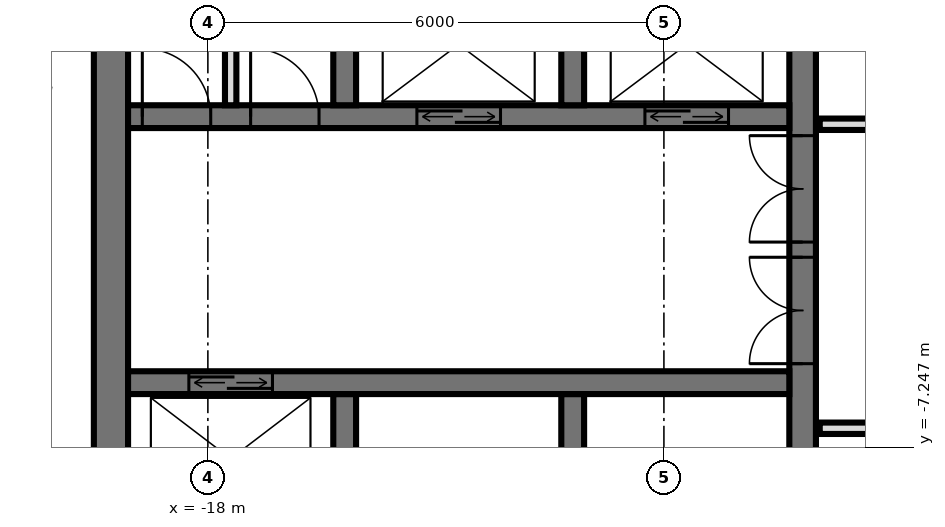
"""IFC4 building model, lengths in metres.
Left out: names, types, materials, properties, quantities, classifications, styles, units other than length and angle.
Written with IfcOpenShell. Run it as: python <this file> out.ifc"""

import sys

from ifc_helpers import new_model, si_unit, direction, frame, frame_2d, origin, place, context, subcontext, project, spatial, rectangle, extrude, element, fill, save


model = new_model("IFC4")
c1 = context("Model", 3, precision=1e-05, world=origin(), true_north=direction((0.0, 1.0)))
c2 = subcontext(c1, "Body", "Model", "MODEL_VIEW")
j1 = project(units=[si_unit("LENGTHUNIT", "METRE"), si_unit("PLANEANGLEUNIT", "RADIAN")], contexts=[c1])
p1 = place(None, origin())
s1 = spatial("IfcSite", under=j1, at=p1, CompositionType="ELEMENT")
p2 = place(p1, origin())
s2 = spatial("IfcBuilding", under=s1, at=p2, CompositionType="ELEMENT")
p3 = place(p2, frame((0.0, 0.0, 291.1)))
s3 = spatial("IfcBuildingStorey", under=s2, at=p3, CompositionType="ELEMENT", Elevation=291.1)
p4 = place(p3, frame((-10.175, -14.55, 0.0), z_axis=(0.0, 0.0, 1.0), x_axis=(0.0, 1.0, 0.0)))
e1 = element("IfcWall", 1, at=p4, inside=s3, PredefinedType="SHEAR", context=c2, shape_type="SweptSolid", body=[
    extrude(rectangle(XDim=14.1, YDim=0.35, at=frame_2d((7.05, 0.0))), origin(), (0.0, 0.0, 1.0), 3.5),
])
p5 = place(p4, frame((8.4, 0.0, 0.0)))
e2 = element("IfcOpeningElement", 2, at=p5, cuts=e1, PredefinedType="OPENING", context=c2, shape_type="SweptSolid", body=[
    extrude(rectangle(XDim=1.4, YDim=2.4, at=frame_2d((0.7, 1.2))), frame((0.0, 0.185, 0.0), z_axis=(0.0, -1.0, 0.0), x_axis=(1.0, 0.0, 0.0)), (0.0, 0.0, 1.0), 0.37),
])
p6 = place(p4, frame((10.0, 0.0, 0.0)))
e3 = element("IfcOpeningElement", 3, at=p6, cuts=e1, PredefinedType="OPENING", context=c2, shape_type="SweptSolid", body=[
    extrude(rectangle(XDim=1.4, YDim=2.4, at=frame_2d((0.7, 1.2))), frame((0.0, 0.185, 0.0), z_axis=(0.0, -1.0, 0.0), x_axis=(1.0, 0.0, 0.0)), (0.0, 0.0, 1.0), 0.37),
])
p7 = place(p4, frame((4.0, 0.0, 0.0)))
e4 = element("IfcOpeningElement", 4, at=p7, cuts=e1, PredefinedType="OPENING", context=c2, shape_type="SweptSolid", body=[
    extrude(rectangle(XDim=1.2, YDim=2.1, at=frame_2d((0.6, 1.05))), frame((0.0, 0.185, 0.0), z_axis=(0.0, -1.0, 0.0), x_axis=(1.0, 0.0, 0.0)), (0.0, 0.0, 1.0), 0.37),
])
p8 = place(p3, frame((-19.275, -14.55, 0.0), z_axis=(0.0, 0.0, 1.0), x_axis=(0.0, 1.0, 0.0)))
e5 = element("IfcWall", 5, at=p8, inside=s3, PredefinedType="SHEAR", context=c2, shape_type="SweptSolid", body=[
    extrude(rectangle(XDim=14.1, YDim=0.45, at=frame_2d((7.05, 0.0))), origin(), (0.0, 0.0, 1.0), 3.5),
])
p9 = place(p3, frame((-19.05, -2.9, 0.0), z_axis=(0.0, 0.0, 1.0), x_axis=(1.0, 0.0, 0.0)))
e6 = element("IfcWall", 6, at=p9, inside=s3, PredefinedType="SHEAR", context=c2, shape_type="SweptSolid", body=[
    extrude(rectangle(XDim=8.7, YDim=0.3, at=frame_2d((4.35, 0.0))), origin(), (0.0, 0.0, 1.0), 3.5),
])
p10 = place(p9, frame((6.8, 0.0, 0.0)))
e7 = element("IfcOpeningElement", 7, at=p10, cuts=e6, PredefinedType="OPENING", context=c2, shape_type="SweptSolid", body=[
    extrude(rectangle(XDim=1.1, YDim=2.1, at=frame_2d((0.55, 1.05))), frame((0.0, 0.16, 0.0), z_axis=(0.0, -1.0, 0.0), x_axis=(1.0, 0.0, 0.0)), (0.0, 0.0, 1.0), 0.32),
])
p11 = place(p9, frame((3.8, 0.0, 0.0)))
e8 = element("IfcOpeningElement", 8, at=p11, cuts=e6, PredefinedType="OPENING", context=c2, shape_type="SweptSolid", body=[
    extrude(rectangle(XDim=1.1, YDim=2.1, at=frame_2d((0.55, 1.05))), frame((0.0, 0.16, 0.0), z_axis=(0.0, -1.0, 0.0), x_axis=(1.0, 0.0, 0.0)), (0.0, 0.0, 1.0), 0.32),
])
p12 = place(p9, frame((1.613, 0.0, 0.0)))
e9 = element("IfcOpeningElement", 9, at=p12, cuts=e6, PredefinedType="OPENING", context=c2, shape_type="SweptSolid", body=[
    extrude(rectangle(XDim=0.9, YDim=2.1, at=frame_2d((0.45, 1.05))), frame((0.0, 0.16, 0.0), z_axis=(0.0, -1.0, 0.0), x_axis=(1.0, 0.0, 0.0)), (0.0, 0.0, 1.0), 0.32),
])
p13 = place(p9, frame((0.188, 0.0, 0.0)))
e10 = element("IfcOpeningElement", 10, at=p13, cuts=e6, PredefinedType="OPENING", context=c2, shape_type="SweptSolid", body=[
    extrude(rectangle(XDim=0.9, YDim=2.1, at=frame_2d((0.45, 1.05))), frame((0.0, 0.16, 0.0), z_axis=(0.0, -1.0, 0.0), x_axis=(1.0, 0.0, 0.0)), (0.0, 0.0, 1.0), 0.32),
])
p14 = place(p3, frame((-19.05, -6.4, 0.0), z_axis=(0.0, 0.0, 1.0), x_axis=(1.0, 0.0, 0.0)))
e11 = element("IfcWall", 11, at=p14, inside=s3, PredefinedType="SHEAR", context=c2, shape_type="SweptSolid", body=[
    extrude(rectangle(XDim=8.7, YDim=0.3, at=frame_2d((4.35, 0.0))), origin(), (0.0, 0.0, 1.0), 3.5),
])
p15 = place(p14, frame((0.8, 0.0, 0.0)))
e12 = element("IfcOpeningElement", 12, at=p15, cuts=e11, PredefinedType="OPENING", context=c2, shape_type="SweptSolid", body=[
    extrude(rectangle(XDim=1.1, YDim=2.1, at=frame_2d((0.55, 1.05))), frame((0.0, 0.16, 0.0), z_axis=(0.0, -1.0, 0.0), x_axis=(1.0, 0.0, 0.0)), (0.0, 0.0, 1.0), 0.32),
])
for number, where, z_axis, x_axis in (
    (13, (-13.2, -2.75, 0.0), (0.0, 0.0, 1.0), (0.0, 1.0, 0.0)),
    (14, (-13.2, -8.85, 0.0), (0.0, 0.0, 1.0), (0.0, 1.0, 0.0)),
    (15, (-16.2, -2.75, 0.0), (0.0, 0.0, 1.0), (0.0, 1.0, 0.0)),
    (16, (-16.2, -8.85, 0.0), (0.0, 0.0, 1.0), (0.0, 1.0, 0.0)),
):
    element("IfcWall", number, at=place(p3, frame(where, z_axis=z_axis, x_axis=x_axis)), inside=s3, PredefinedType="SHEAR", context=c2, shape_type="SweptSolid", body=[
        extrude(rectangle(XDim=2.3, YDim=0.3, at=frame_2d((1.15, 0.0))), origin(), (0.0, 0.0, 1.0), 3.5),
    ])
p16 = place(p3, frame((-17.7, -2.75, 0.0), z_axis=(0.0, 0.0, 1.0), x_axis=(0.0, 1.0, 0.0)))
e17 = element("IfcWall", 17, at=p16, inside=s3, PredefinedType="PARTITIONING", context=c2, shape_type="SweptSolid", body=[
    extrude(rectangle(XDim=2.3, YDim=0.15, at=frame_2d((1.15, 0.0))), origin(), (0.0, 0.0, 1.0), 3.2),
])
p17 = place(p3, frame((-9.95, -7.0, 0.0), z_axis=(0.0, 0.0, 1.0), x_axis=(1.0, 0.0, 0.0)))
e18 = element("IfcWall", 18, at=p17, inside=s3, PredefinedType="PARTITIONING", context=c2, shape_type="SweptSolid", body=[
    extrude(rectangle(XDim=19.9, YDim=0.15, at=frame_2d((9.95, 0.0))), origin(), (0.0, 0.0, 1.0), 3.22),
])
p18 = place(p17, frame((9.45, 0.0, 0.0)))
e19 = element("IfcOpeningElement", 19, at=p18, cuts=e18, PredefinedType="OPENING", context=c2, shape_type="SweptSolid", body=[
    extrude(rectangle(XDim=1.0, YDim=2.1, at=frame_2d((0.5, 1.05))), frame((0.0, 0.085, 0.0), z_axis=(0.0, -1.0, 0.0), x_axis=(1.0, 0.0, 0.0)), (0.0, 0.0, 1.0), 0.17),
])
p19 = place(p17, frame((15.45, 0.0, 0.0)))
e20 = element("IfcOpeningElement", 20, at=p19, cuts=e18, PredefinedType="OPENING", context=c2, shape_type="SweptSolid", body=[
    extrude(rectangle(XDim=1.0, YDim=2.1, at=frame_2d((0.5, 1.05))), frame((0.0, 0.085, 0.0), z_axis=(0.0, -1.0, 0.0), x_axis=(1.0, 0.0, 0.0)), (0.0, 0.0, 1.0), 0.17),
])
p20 = place(p3, frame((-9.95, -3.0, 0.0), z_axis=(0.0, 0.0, 1.0), x_axis=(1.0, 0.0, 0.0)))
e21 = element("IfcWall", 21, at=p20, inside=s3, PredefinedType="PARTITIONING", context=c2, shape_type="SweptSolid", body=[
    extrude(rectangle(XDim=19.9, YDim=0.15, at=frame_2d((9.95, 0.0))), origin(), (0.0, 0.0, 1.0), 3.22),
])
p21 = place(p20, frame((0.95, 0.0, 0.0)))
e22 = element("IfcOpeningElement", 22, at=p21, cuts=e21, PredefinedType="OPENING", context=c2, shape_type="SweptSolid", body=[
    extrude(rectangle(XDim=1.0, YDim=2.1, at=frame_2d((0.5, 1.05))), frame((0.0, 0.085, 0.0), z_axis=(0.0, -1.0, 0.0), x_axis=(1.0, 0.0, 0.0)), (0.0, 0.0, 1.0), 0.17),
])
p22 = place(p20, frame((3.7, 0.0, 0.0)))
e23 = element("IfcOpeningElement", 23, at=p22, cuts=e21, PredefinedType="OPENING", context=c2, shape_type="SweptSolid", body=[
    extrude(rectangle(XDim=1.0, YDim=2.1, at=frame_2d((0.5, 1.05))), frame((0.0, 0.085, 0.0), z_axis=(0.0, -1.0, 0.0), x_axis=(1.0, 0.0, 0.0)), (0.0, 0.0, 1.0), 0.17),
])
p23 = place(p20, frame((7.95, 0.0, 0.0)))
e24 = element("IfcOpeningElement", 24, at=p23, cuts=e21, PredefinedType="OPENING", context=c2, shape_type="SweptSolid", body=[
    extrude(rectangle(XDim=1.0, YDim=2.1, at=frame_2d((0.5, 1.05))), frame((0.0, 0.085, 0.0), z_axis=(0.0, -1.0, 0.0), x_axis=(1.0, 0.0, 0.0)), (0.0, 0.0, 1.0), 0.17),
])
p24 = place(p20, frame((15.2, 0.0, 0.0)))
e25 = element("IfcOpeningElement", 25, at=p24, cuts=e21, PredefinedType="OPENING", context=c2, shape_type="SweptSolid", body=[
    extrude(rectangle(XDim=1.0, YDim=2.1, at=frame_2d((0.5, 1.05))), frame((0.0, 0.085, 0.0), z_axis=(0.0, -1.0, 0.0), x_axis=(1.0, 0.0, 0.0)), (0.0, 0.0, 1.0), 0.17),
])
p25 = place(p10, origin())
e26 = element("IfcDoor", 26, at=p25, inside=s3, OperationType="DOUBLE_DOOR_SLIDING", PredefinedType="USERDEFINED", context=c2, shape_type="SweptSolid", body=[
    extrude(rectangle(XDim=1.1, YDim=2.1, at=frame_2d((0.55, 1.05))), frame((0.0, 0.025, 0.0), z_axis=(0.0, -1.0, 0.0), x_axis=(1.0, 0.0, 0.0)), (0.0, 0.0, 1.0), 0.05),
])
fill(e7, e26)
p26 = place(p11, origin())
e27 = element("IfcDoor", 27, at=p26, inside=s3, OperationType="DOUBLE_DOOR_SLIDING", PredefinedType="USERDEFINED", context=c2, shape_type="SweptSolid", body=[
    extrude(rectangle(XDim=1.1, YDim=2.1, at=frame_2d((0.55, 1.05))), frame((0.0, 0.025, 0.0), z_axis=(0.0, -1.0, 0.0), x_axis=(1.0, 0.0, 0.0)), (0.0, 0.0, 1.0), 0.05),
])
fill(e8, e27)
p27 = place(p15, origin())
e28 = element("IfcDoor", 28, at=p27, inside=s3, OperationType="DOUBLE_DOOR_SLIDING", PredefinedType="USERDEFINED", context=c2, shape_type="SweptSolid", body=[
    extrude(rectangle(XDim=1.1, YDim=2.1, at=frame_2d((0.55, 1.05))), frame((0.0, 0.025, 0.0), z_axis=(0.0, -1.0, 0.0), x_axis=(1.0, 0.0, 0.0)), (0.0, 0.0, 1.0), 0.05),
])
fill(e12, e28)
p28 = place(p5, origin())
e29 = element("IfcDoor", 29, at=p28, inside=s3, OperationType="DOUBLE_DOOR_SINGLE_SWING", PredefinedType="DOOR", context=c2, shape_type="SweptSolid", body=[
    extrude(rectangle(XDim=1.4, YDim=2.4, at=frame_2d((0.7, 1.2))), frame((0.0, 0.025, 0.0), z_axis=(0.0, -1.0, 0.0), x_axis=(1.0, 0.0, 0.0)), (0.0, 0.0, 1.0), 0.05),
])
fill(e2, e29)
p29 = place(p6, origin())
e30 = element("IfcDoor", 30, at=p29, inside=s3, OperationType="DOUBLE_DOOR_SINGLE_SWING", PredefinedType="DOOR", context=c2, shape_type="SweptSolid", body=[
    extrude(rectangle(XDim=1.4, YDim=2.4, at=frame_2d((0.7, 1.2))), frame((0.0, 0.025, 0.0), z_axis=(0.0, -1.0, 0.0), x_axis=(1.0, 0.0, 0.0)), (0.0, 0.0, 1.0), 0.05),
])
fill(e3, e30)
p30 = place(p12, origin())
e31 = element("IfcDoor", 31, at=p30, inside=s3, OperationType="SINGLE_SWING_RIGHT", PredefinedType="DOOR", context=c2, shape_type="SweptSolid", body=[
    extrude(rectangle(XDim=0.9, YDim=2.1, at=frame_2d((0.45, 1.05))), frame((0.0, 0.025, 0.0), z_axis=(0.0, -1.0, 0.0), x_axis=(1.0, 0.0, 0.0)), (0.0, 0.0, 1.0), 0.05),
])
fill(e9, e31)
p31 = place(p13, origin())
e32 = element("IfcDoor", 32, at=p31, inside=s3, OperationType="SINGLE_SWING_RIGHT", PredefinedType="DOOR", context=c2, shape_type="SweptSolid", body=[
    extrude(rectangle(XDim=0.9, YDim=2.1, at=frame_2d((0.45, 1.05))), frame((0.0, 0.025, 0.0), z_axis=(0.0, -1.0, 0.0), x_axis=(1.0, 0.0, 0.0)), (0.0, 0.0, 1.0), 0.05),
])
fill(e10, e32)
save(model, sys.argv[1])
